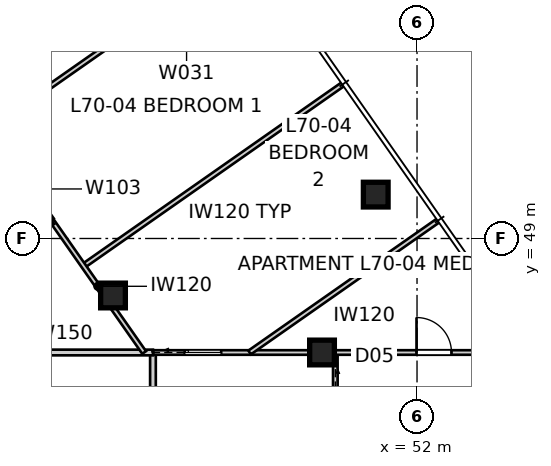
"""IFC4 building model, lengths in metres.
Left out: names, types, materials, properties, quantities, classifications, styles, units other than length and angle.
Written with IfcOpenShell. Run it as: python <this file> out.ifc"""

import sys

from ifc_helpers import new_model, si_unit, direction, frame, frame_2d, origin, origin_2d, place, context, subcontext, project, spatial, rectangle, extrude, element, fill, save


model = new_model("IFC4")
c1 = context("Model", 3, precision=1e-05, world=origin(), true_north=direction((0.0, 1.0)))
c2 = subcontext(c1, "Body", "Model", "MODEL_VIEW")
j1 = project(units=[si_unit("LENGTHUNIT", "METRE"), si_unit("PLANEANGLEUNIT", "RADIAN")], contexts=[c1])
p1 = place(None, origin())
s1 = spatial("IfcSite", under=j1, at=p1, CompositionType="ELEMENT")
p2 = place(p1, origin())
s2 = spatial("IfcBuilding", under=s1, at=p2, CompositionType="ELEMENT")
p3 = place(p2, frame((0.0, 0.0, 254.0)))
s3 = spatial("IfcBuildingStorey", under=s2, at=p3, CompositionType="ELEMENT", Elevation=254.0)
for number, where, z_axis, x_axis in (
    (1, (50.914, 50.155, 0.0), (0.0, 0.0, 1.0), (1.0, 0.0, 0.0)),
    (2, (49.5, 46.0, 0.0), (0.0, 0.0, 1.0), (1.0, 0.0, 0.0)),
    (3, (44.0, 47.5, 0.0), (0.0, 0.0, 1.0), (1.0, 0.0, 0.0)),
):
    element("IfcColumn", number, at=place(p3, frame(where, z_axis=z_axis, x_axis=x_axis)), inside=s3, PredefinedType="COLUMN", context=c2, shape_type="SweptSolid", body=[
        extrude(rectangle(XDim=0.65, YDim=0.65, at=origin_2d()), origin(), (0.0, 0.0, 1.0), 3.4),
    ])
p4 = place(p3, frame((45.051, 42.1, 0.0), z_axis=(0.0, 0.0, 1.0), x_axis=(0.0, 1.0, 0.0)))
e4 = element("IfcWall", 4, at=p4, inside=s3, PredefinedType="SOLIDWALL", context=c2, shape_type="SweptSolid", body=[
    extrude(rectangle(XDim=3.9, YDim=0.15, at=frame_2d((1.95, 0.0))), origin(), (0.0, 0.0, 1.0), 3.25),
])
p5 = place(p4, frame((1.47, 0.0, 0.0)))
e5 = element("IfcOpeningElement", 5, at=p5, cuts=e4, PredefinedType="OPENING", context=c2, shape_type="SweptSolid", body=[
    extrude(rectangle(XDim=0.96, YDim=2.1, at=frame_2d((0.48, 1.05))), frame((0.0, 0.085, 0.0), z_axis=(0.0, -1.0, 0.0), x_axis=(1.0, 0.0, 0.0)), (0.0, 0.0, 1.0), 0.17),
])
p6 = place(p3, frame((49.85, 46.0, 0.0), z_axis=(0.0, 0.0, 1.0), x_axis=(0.0, -1.0, 0.0)))
e6 = element("IfcWall", 6, at=p6, inside=s3, PredefinedType="PARTITIONING", context=c2, shape_type="SweptSolid", body=[
    extrude(rectangle(XDim=2.913, YDim=0.12, at=frame_2d((1.457, 0.0))), origin(), (0.0, 0.0, 1.0), 3.25),
])
p7 = place(p6, frame((0.977, 0.0, 0.0)))
e7 = element("IfcOpeningElement", 7, at=p7, cuts=e6, PredefinedType="OPENING", context=c2, shape_type="SweptSolid", body=[
    extrude(rectangle(XDim=0.96, YDim=2.1, at=frame_2d((0.48, 1.05))), frame((0.0, 0.07, 0.0), z_axis=(0.0, -1.0, 0.0), x_axis=(1.0, 0.0, 0.0)), (0.0, 0.0, 1.0), 0.14),
])
p8 = place(p3, frame((45.051, 46.0, 0.0), z_axis=(0.0, 0.0, 1.0), x_axis=(1.0, 0.0, 0.0)))
e8 = element("IfcWall", 8, at=p8, inside=s3, PredefinedType="PARTITIONING", context=c2, shape_type="SweptSolid", body=[
    extrude(rectangle(XDim=9.943, YDim=0.12, at=frame_2d((4.972, 0.0))), origin(), (0.0, 0.0, 1.0), 2.549),
])
p9 = place(p8, frame((0.835, 0.0, 0.0)))
e9 = element("IfcOpeningElement", 9, at=p9, cuts=e8, PredefinedType="OPENING", context=c2, shape_type="SweptSolid", body=[
    extrude(rectangle(XDim=0.96, YDim=2.1, at=frame_2d((0.48, 1.05))), frame((0.0, 0.07, 0.0), z_axis=(0.0, -1.0, 0.0), x_axis=(1.0, 0.0, 0.0)), (0.0, 0.0, 1.0), 0.14),
])
p10 = place(p8, frame((6.935, 0.0, 0.0)))
e10 = element("IfcOpeningElement", 10, at=p10, cuts=e8, PredefinedType="OPENING", context=c2, shape_type="SweptSolid", body=[
    extrude(rectangle(XDim=0.92, YDim=2.34, at=frame_2d((0.46, 1.17))), frame((0.0, 0.07, 0.0), z_axis=(0.0, -1.0, 0.0), x_axis=(1.0, 0.0, 0.0)), (0.0, 0.0, 1.0), 0.14),
])
p11 = place(p3, frame((40.253, 46.0, 0.0), z_axis=(0.0, 0.0, 1.0), x_axis=(1.0, 0.0, 0.0)))
e11 = element("IfcWall", 11, at=p11, inside=s3, PredefinedType="SOLIDWALL", context=c2, shape_type="SweptSolid", body=[
    extrude(rectangle(XDim=4.799, YDim=0.15, at=frame_2d((2.399, 0.0))), origin(), (0.0, 0.0, 1.0), 3.25),
])
p12 = place(p3, frame((50.051, 53.06, 0.0), z_axis=(0.0, 0.0, 1.0), x_axis=(-0.819152099525, -0.573576357466, 0.0)))
e12 = element("IfcWall", 12, at=p12, inside=s3, PredefinedType="PARTITIONING", context=c2, shape_type="SweptSolid", body=[
    extrude(rectangle(XDim=8.335, YDim=0.12, at=frame_2d((4.167, 0.0))), origin(), (0.0, 0.0, 1.0), 3.25),
])
p13 = place(p3, frame((44.819, 46.0, 0.0), z_axis=(0.0, 0.0, 1.0), x_axis=(-0.573566368211, 0.819159093985, 0.0)))
e13 = element("IfcWall", 13, at=p13, inside=s3, PredefinedType="PARTITIONING", context=c2, shape_type="SweptSolid", body=[
    extrude(rectangle(XDim=4.253, YDim=0.12, at=frame_2d((2.126, 0.0))), origin(), (0.0, 0.0, 1.0), 3.25),
])
p14 = place(p3, frame((40.714, 51.863, 0.0), z_axis=(0.0, 0.0, 1.0), x_axis=(0.819139307094, 0.573594626521, 0.0)))
e14 = element("IfcWall", 14, at=p14, inside=s3, PredefinedType="PARTITIONING", context=c2, shape_type="SweptSolid", body=[
    extrude(rectangle(XDim=4.335, YDim=0.12, at=frame_2d((2.167, 0.0))), origin(), (0.0, 0.0, 1.0), 3.25),
])
p15 = place(p3, frame((42.38, 49.484, 0.0), z_axis=(0.0, 0.0, 1.0), x_axis=(-0.573585144111, 0.819145946981, 0.0)))
e15 = element("IfcWall", 15, at=p15, inside=s3, PredefinedType="SOLIDWALL", context=c2, shape_type="SweptSolid", body=[
    extrude(rectangle(XDim=2.001, YDim=0.15, at=frame_2d((1.001, 0.0))), origin(), (0.0, 0.0, 1.0), 3.25),
])
p16 = place(p15, frame((0.541, 0.0, 0.0)))
e16 = element("IfcOpeningElement", 16, at=p16, cuts=e15, PredefinedType="OPENING", context=c2, shape_type="SweptSolid", body=[
    extrude(rectangle(XDim=0.92, YDim=2.34, at=frame_2d((0.46, 1.17))), frame((0.0, 0.085, 0.0), z_axis=(0.0, -1.0, 0.0), x_axis=(1.0, 0.0, 0.0)), (0.0, 0.0, 1.0), 0.17),
])
p17 = place(p3, frame((52.56, 49.477, 0.0), z_axis=(0.0, 0.0, 1.0), x_axis=(-0.81915432861, -0.573573173989, 0.0)))
e17 = element("IfcWall", 17, at=p17, inside=s3, PredefinedType="PARTITIONING", context=c2, shape_type="SweptSolid", body=[
    extrude(rectangle(XDim=6.061, YDim=0.12, at=frame_2d((3.031, 0.0))), origin(), (0.0, 0.0, 1.0), 3.25),
])
p18 = place(p3, frame((38.825, 46.933, 0.0), z_axis=(0.0, 0.0, 1.0), x_axis=(0.81916112811, 0.573563463091, 0.0)))
e18 = element("IfcWall", 18, at=p18, inside=s3, PredefinedType="SOLIDWALL", context=c2, shape_type="SweptSolid", body=[
    extrude(rectangle(XDim=4.375, YDim=0.15, at=frame_2d((2.188, 0.0))), origin(), (0.0, 0.0, 1.0), 3.25),
])
p19 = place(p18, frame((1.728, 0.0, 0.0)))
e19 = element("IfcOpeningElement", 19, at=p19, cuts=e18, PredefinedType="OPENING", context=c2, shape_type="SweptSolid", body=[
    extrude(rectangle(XDim=0.92, YDim=2.34, at=frame_2d((0.46, 1.17))), frame((0.0, 0.085, 0.0), z_axis=(0.0, -1.0, 0.0), x_axis=(1.0, 0.0, 0.0)), (0.0, 0.0, 1.0), 0.17),
])
p20 = place(p9, origin())
e20 = element("IfcDoor", 20, at=p20, inside=s3, OperationType="SLIDING_TO_LEFT", PredefinedType="DOOR", context=c2, shape_type="SweptSolid", body=[
    extrude(rectangle(XDim=0.96, YDim=2.1, at=frame_2d((0.48, 1.05))), frame((0.0, 0.025, 0.0), z_axis=(0.0, -1.0, 0.0), x_axis=(1.0, 0.0, 0.0)), (0.0, 0.0, 1.0), 0.05),
])
fill(e9, e20)
p21 = place(p10, origin())
e21 = element("IfcDoor", 21, at=p21, inside=s3, OperationType="SINGLE_SWING_LEFT", PredefinedType="DOOR", context=c2, shape_type="SweptSolid", body=[
    extrude(rectangle(XDim=0.92, YDim=2.34, at=frame_2d((0.46, 1.17))), frame((0.0, 0.025, 0.0), z_axis=(0.0, -1.0, 0.0), x_axis=(1.0, 0.0, 0.0)), (0.0, 0.0, 1.0), 0.05),
])
fill(e10, e21)
save(model, sys.argv[1])
